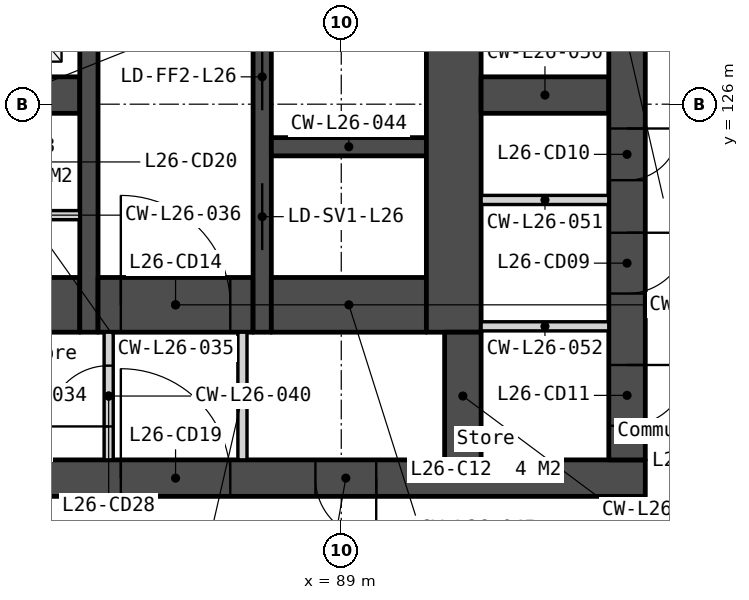
"""IFC4 building model, lengths in metres.
Left out: names, types, materials, properties, quantities, classifications, styles, units other than length and angle.
Written with IfcOpenShell. Run it as: python <this file> out.ifc"""

import sys

from ifc_helpers import new_model, si_unit, direction, frame, frame_2d, origin, place, context, subcontext, project, spatial, polyline, rectangle, outline, extrude, element, fill, save


model = new_model("IFC4")
c1 = context("Model", 3, precision=1e-05, world=origin(), true_north=direction((0.0, 1.0)))
c2 = subcontext(c1, "Body", "Model", "MODEL_VIEW")
j1 = project(units=[si_unit("LENGTHUNIT", "METRE"), si_unit("PLANEANGLEUNIT", "RADIAN")], contexts=[c1])
p1 = place(None, origin())
s1 = spatial("IfcSite", under=j1, at=p1, CompositionType="ELEMENT")
p2 = place(p1, origin())
s2 = spatial("IfcBuilding", under=s1, at=p2, CompositionType="ELEMENT")
p3 = place(p2, frame((0.0, 0.0, 106.3)))
s3 = spatial("IfcBuildingStorey", under=s2, at=p3, CompositionType="ELEMENT", Elevation=106.3)
p4 = place(p3, frame((66.0, 119.85, 0.0), z_axis=(0.0, 0.0, 1.0), x_axis=(1.0, 0.0, 0.0)))
e1 = element("IfcWall", 1, at=p4, inside=s3, PredefinedType="SOLIDWALL", context=c2, shape_type="SweptSolid", body=[
    extrude(rectangle(XDim=28.0, YDim=0.6, at=frame_2d((14.0, 0.0))), origin(), (0.0, 0.0, 1.0), 3.35),
])
p5 = place(p4, frame((6.825, 0.0, 0.0)))
e2 = element("IfcOpeningElement", 2, at=p5, cuts=e1, PredefinedType="OPENING", context=c2, shape_type="SweptSolid", body=[
    extrude(rectangle(XDim=1.8, YDim=2.1, at=frame_2d((0.9, 1.05))), frame((0.0, 0.31, 0.0), z_axis=(0.0, -1.0, 0.0), x_axis=(1.0, 0.0, 0.0)), (0.0, 0.0, 1.0), 0.62),
])
p6 = place(p4, frame((15.85, 0.0, 0.0)))
e3 = element("IfcOpeningElement", 3, at=p6, cuts=e1, PredefinedType="OPENING", context=c2, shape_type="SweptSolid", body=[
    extrude(rectangle(XDim=1.5, YDim=2.1, at=frame_2d((0.75, 1.05))), frame((0.0, 0.31, 0.0), z_axis=(0.0, -1.0, 0.0), x_axis=(1.0, 0.0, 0.0)), (0.0, 0.0, 1.0), 0.62),
])
p7 = place(p4, frame((19.375, 0.0, 0.0)))
e4 = element("IfcOpeningElement", 4, at=p7, cuts=e1, PredefinedType="OPENING", context=c2, shape_type="SweptSolid", body=[
    extrude(rectangle(XDim=1.8, YDim=2.1, at=frame_2d((0.9, 1.05))), frame((0.0, 0.31, 0.0), z_axis=(0.0, -1.0, 0.0), x_axis=(1.0, 0.0, 0.0)), (0.0, 0.0, 1.0), 0.62),
])
p8 = place(p4, frame((4.425, 0.0, 0.0)))
e5 = element("IfcOpeningElement", 5, at=p8, cuts=e1, PredefinedType="OPENING", context=c2, shape_type="SweptSolid", body=[
    extrude(rectangle(XDim=1.0, YDim=2.1, at=frame_2d((0.5, 1.05))), frame((0.0, 0.31, 0.0), z_axis=(0.0, -1.0, 0.0), x_axis=(1.0, 0.0, 0.0)), (0.0, 0.0, 1.0), 0.62),
])
p9 = place(p4, frame((9.783, 0.0, 0.0)))
e6 = element("IfcOpeningElement", 6, at=p9, cuts=e1, PredefinedType="OPENING", context=c2, shape_type="SweptSolid", body=[
    extrude(rectangle(XDim=1.0, YDim=2.1, at=frame_2d((0.5, 1.05))), frame((0.0, 0.31, 0.0), z_axis=(0.0, -1.0, 0.0), x_axis=(1.0, 0.0, 0.0)), (0.0, 0.0, 1.0), 0.62),
])
p10 = place(p4, frame((11.525, 0.0, 0.0)))
e7 = element("IfcOpeningElement", 7, at=p10, cuts=e1, PredefinedType="OPENING", context=c2, shape_type="SweptSolid", body=[
    extrude(rectangle(XDim=1.0, YDim=2.1, at=frame_2d((0.5, 1.05))), frame((0.0, 0.31, 0.0), z_axis=(0.0, -1.0, 0.0), x_axis=(1.0, 0.0, 0.0)), (0.0, 0.0, 1.0), 0.62),
])
p11 = place(p4, frame((13.658, 0.0, 0.0)))
e8 = element("IfcOpeningElement", 8, at=p11, cuts=e1, PredefinedType="OPENING", context=c2, shape_type="SweptSolid", body=[
    extrude(rectangle(XDim=1.0, YDim=2.1, at=frame_2d((0.5, 1.05))), frame((0.0, 0.31, 0.0), z_axis=(0.0, -1.0, 0.0), x_axis=(1.0, 0.0, 0.0)), (0.0, 0.0, 1.0), 0.62),
])
p12 = place(p4, frame((22.575, 0.0, 0.0)))
e9 = element("IfcOpeningElement", 9, at=p12, cuts=e1, PredefinedType="OPENING", context=c2, shape_type="SweptSolid", body=[
    extrude(rectangle(XDim=1.0, YDim=2.1, at=frame_2d((0.5, 1.05))), frame((0.0, 0.31, 0.0), z_axis=(0.0, -1.0, 0.0), x_axis=(1.0, 0.0, 0.0)), (0.0, 0.0, 1.0), 0.62),
])
p13 = place(p3, frame((81.8, 122.7, 0.0), z_axis=(0.0, 0.0, 1.0), x_axis=(1.0, 0.0, 0.0)))
e10 = element("IfcWall", 10, at=p13, inside=s3, PredefinedType="SOLIDWALL", context=c2, shape_type="SweptSolid", body=[
    extrude(rectangle(XDim=2.9, YDim=0.9, at=frame_2d((1.45, 0.0))), origin(), (0.0, 0.0, 1.0), 3.35),
])
p14 = place(p13, frame((0.05, 0.0, 0.0)))
e11 = element("IfcOpeningElement", 11, at=p14, cuts=e10, PredefinedType="OPENING", context=c2, shape_type="SweptSolid", body=[
    extrude(rectangle(XDim=1.5, YDim=2.1, at=frame_2d((0.75, 1.05))), frame((0.0, 0.46, 0.0), z_axis=(0.0, -1.0, 0.0), x_axis=(1.0, 0.0, 0.0)), (0.0, 0.0, 1.0), 0.92),
])
p15 = place(p3, frame((82.6, 126.15, 0.0), z_axis=(0.0, 0.0, 1.0), x_axis=(1.0, 0.0, 0.0)))
e12 = element("IfcWall", 12, at=p15, inside=s3, PredefinedType="SOLIDWALL", context=c2, shape_type="SweptSolid", body=[
    extrude(rectangle(XDim=2.1, YDim=0.6, at=frame_2d((1.05, 0.0))), origin(), (0.0, 0.0, 1.0), 3.35),
])
p16 = place(p3, frame((83.35, 124.175, 0.0), z_axis=(0.0, 0.0, 1.0), x_axis=(1.0, 0.0, 0.0)))
e13 = element("IfcWall", 13, at=p16, inside=s3, PredefinedType="PARTITIONING", context=c2, shape_type="SweptSolid", body=[
    extrude(rectangle(XDim=1.35, YDim=0.15, at=frame_2d((0.675, 0.0))), origin(), (0.0, 0.0, 1.0), 3.35),
])
p17 = place(p3, frame((84.85, 133.95, 0.0), z_axis=(0.0, 0.0, 1.0), x_axis=(0.0, -1.0, 0.0)))
e14 = element("IfcWall", 14, at=p17, inside=s3, PredefinedType="SOLIDWALL", context=c2, shape_type="SweptSolid", body=[
    extrude(rectangle(XDim=11.7, YDim=0.3, at=frame_2d((5.85, 0.0))), origin(), (0.0, 0.0, 1.0), 3.35),
])
p18 = place(p3, frame((85.0, 122.7, 0.0), z_axis=(0.0, 0.0, 1.0), x_axis=(1.0, 0.0, 0.0)))
e15 = element("IfcWall", 15, at=p18, inside=s3, PredefinedType="SOLIDWALL", context=c2, shape_type="SweptSolid", body=[
    extrude(rectangle(XDim=2.55, YDim=0.9, at=frame_2d((1.275, 0.0))), origin(), (0.0, 0.0, 1.0), 3.35),
])
p19 = place(p18, frame((0.375, 0.0, 0.0)))
e16 = element("IfcOpeningElement", 16, at=p19, cuts=e15, PredefinedType="OPENING", context=c2, shape_type="SweptSolid", body=[
    extrude(rectangle(XDim=1.8, YDim=2.1, at=frame_2d((0.9, 1.05))), frame((0.0, 0.46, 0.0), z_axis=(0.0, -1.0, 0.0), x_axis=(1.0, 0.0, 0.0)), (0.0, 0.0, 1.0), 0.92),
])
p20 = place(p3, frame((85.175, 122.25, 0.0), z_axis=(0.0, 0.0, 1.0), x_axis=(0.0, -1.0, 0.0)))
e17 = element("IfcWall", 17, at=p20, inside=s3, PredefinedType="PARTITIONING", context=c2, shape_type="SweptSolid", body=[
    extrude(rectangle(XDim=2.1, YDim=0.15, at=frame_2d((1.05, 0.0))), origin(), (0.0, 0.0, 1.0), 3.35),
])
p21 = place(p20, frame((0.55, 0.0, 0.0)))
e18 = element("IfcOpeningElement", 18, at=p21, cuts=e17, PredefinedType="OPENING", context=c2, shape_type="SweptSolid", body=[
    extrude(rectangle(XDim=1.0, YDim=2.1, at=frame_2d((0.5, 1.05))), frame((0.0, 0.085, 0.0), z_axis=(0.0, -1.0, 0.0), x_axis=(1.0, 0.0, 0.0)), (0.0, 0.0, 1.0), 0.17),
])
p22 = place(p3, frame((87.375, 122.25, 0.0), z_axis=(0.0, 0.0, 1.0), x_axis=(0.0, -1.0, 0.0)))
e19 = element("IfcWall", 19, at=p22, inside=s3, PredefinedType="PARTITIONING", context=c2, shape_type="SweptSolid", body=[
    extrude(rectangle(XDim=2.1, YDim=0.15, at=frame_2d((1.05, 0.0))), origin(), (0.0, 0.0, 1.0), 3.35),
])
p23 = place(p3, frame((87.7, 133.95, 0.0), z_axis=(0.0, 0.0, 1.0), x_axis=(0.0, -1.0, 0.0)))
e20 = element("IfcWall", 20, at=p23, inside=s3, PredefinedType="SOLIDWALL", context=c2, shape_type="SweptSolid", body=[
    extrude(rectangle(XDim=11.7, YDim=0.3, at=frame_2d((5.85, 0.0))), origin(), (0.0, 0.0, 1.0), 3.35),
])
p24 = place(p23, frame((6.95, 0.0, 0.0)))
e21 = element("IfcOpeningElement", 21, at=p24, cuts=e20, PredefinedType="OPENING", context=c2, shape_type="SweptSolid", body=[
    extrude(rectangle(XDim=1.1, YDim=2.1, at=frame_2d((0.55, 1.05))), frame((0.0, 0.16, 0.0), z_axis=(0.0, -1.0, 0.0), x_axis=(1.0, 0.0, 0.0)), (0.0, 0.0, 1.0), 0.32),
])
p25 = place(p23, frame((5.1, 0.0, 0.0)))
e22 = element("IfcOpeningElement", 22, at=p25, cuts=e20, PredefinedType="OPENING", context=c2, shape_type="SweptSolid", body=[
    extrude(rectangle(XDim=1.0, YDim=2.1, at=frame_2d((0.5, 1.05))), frame((0.0, 0.16, 0.0), z_axis=(0.0, -1.0, 0.0), x_axis=(1.0, 0.0, 0.0)), (0.0, 0.0, 1.0), 0.32),
])
p26 = place(p23, frame((9.25, 0.0, 0.0)))
e23 = element("IfcOpeningElement", 23, at=p26, cuts=e20, PredefinedType="OPENING", context=c2, shape_type="SweptSolid", body=[
    extrude(rectangle(XDim=1.1, YDim=2.1, at=frame_2d((0.55, 1.05))), frame((0.0, 0.16, 0.0), z_axis=(0.0, -1.0, 0.0), x_axis=(1.0, 0.0, 0.0)), (0.0, 0.0, 1.0), 0.32),
])
p27 = place(p3, frame((87.85, 125.3, 0.0), z_axis=(0.0, 0.0, 1.0), x_axis=(1.0, 0.0, 0.0)))
e24 = element("IfcWall", 24, at=p27, inside=s3, PredefinedType="SOLIDWALL", context=c2, shape_type="SweptSolid", body=[
    extrude(rectangle(XDim=2.55, YDim=0.3, at=frame_2d((1.275, 0.0))), origin(), (0.0, 0.0, 1.0), 3.35),
])
p28 = place(p3, frame((87.85, 122.7, 0.0), z_axis=(0.0, 0.0, 1.0), x_axis=(1.0, 0.0, 0.0)))
e25 = element("IfcWall", 25, at=p28, inside=s3, PredefinedType="SOLIDWALL", context=c2, shape_type="SweptSolid", body=[
    extrude(rectangle(XDim=2.55, YDim=0.9, at=frame_2d((1.275, 0.0))), origin(), (0.0, 0.0, 1.0), 3.35),
])
p29 = place(p3, frame((90.85, 133.95, 0.0), z_axis=(0.0, 0.0, 1.0), x_axis=(0.0, -1.0, 0.0)))
e26 = element("IfcWall", 26, at=p29, inside=s3, PredefinedType="SOLIDWALL", context=c2, shape_type="SweptSolid", body=[
    extrude(rectangle(XDim=11.7, YDim=0.9, at=frame_2d((5.85, 0.0))), origin(), (0.0, 0.0, 1.0), 3.35),
])
p30 = place(p3, frame((91.0, 122.25, 0.0), z_axis=(0.0, 0.0, 1.0), x_axis=(0.0, -1.0, 0.0)))
e27 = element("IfcWall", 27, at=p30, inside=s3, PredefinedType="SOLIDWALL", context=c2, shape_type="SweptSolid", body=[
    extrude(rectangle(XDim=2.1, YDim=0.6, at=frame_2d((1.05, 0.0))), origin(), (0.0, 0.0, 1.0), 3.35),
])
p31 = place(p3, frame((91.3, 126.15, 0.0), z_axis=(0.0, 0.0, 1.0), x_axis=(1.0, 0.0, 0.0)))
e28 = element("IfcWall", 28, at=p31, inside=s3, PredefinedType="SOLIDWALL", context=c2, shape_type="SweptSolid", body=[
    extrude(rectangle(XDim=2.1, YDim=0.6, at=frame_2d((1.05, 0.0))), origin(), (0.0, 0.0, 1.0), 3.35),
])
for number, where, z_axis, x_axis in (
    (29, (91.3, 124.425, 0.0), (0.0, 0.0, 1.0), (1.0, 0.0, 0.0)),
    (30, (91.3, 122.346, 0.0), (0.0, 0.0, 1.0), (1.0, 0.0, 0.0)),
):
    element("IfcWall", number, at=place(p3, frame(where, z_axis=z_axis, x_axis=x_axis)), inside=s3, PredefinedType="PARTITIONING", context=c2, shape_type="SweptSolid", body=[
        extrude(rectangle(XDim=2.1, YDim=0.15, at=frame_2d((1.05, 0.0))), origin(), (0.0, 0.0, 1.0), 3.35),
    ])
p32 = place(p3, frame((93.7, 133.95, 0.0), z_axis=(0.0, 0.0, 1.0), x_axis=(0.0, -1.0, 0.0)))
e31 = element("IfcWall", 31, at=p32, inside=s3, PredefinedType="SOLIDWALL", context=c2, shape_type="SweptSolid", body=[
    extrude(rectangle(XDim=13.8, YDim=0.6, at=frame_2d((6.9, 0.0))), origin(), (0.0, 0.0, 1.0), 3.35),
])
p33 = place(p32, frame((0.6, 0.0, 0.0)))
e32 = element("IfcOpeningElement", 32, at=p33, cuts=e31, PredefinedType="OPENING", context=c2, shape_type="SweptSolid", body=[
    extrude(rectangle(XDim=1.1, YDim=2.1, at=frame_2d((0.55, 1.05))), frame((0.0, 0.31, 0.0), z_axis=(0.0, -1.0, 0.0), x_axis=(1.0, 0.0, 0.0)), (0.0, 0.0, 1.0), 0.62),
])
p34 = place(p32, frame((10.064, 0.0, 0.0)))
e33 = element("IfcOpeningElement", 33, at=p34, cuts=e31, PredefinedType="OPENING", context=c2, shape_type="SweptSolid", body=[
    extrude(rectangle(XDim=1.0, YDim=2.1, at=frame_2d((0.5, 1.05))), frame((0.0, 0.31, 0.0), z_axis=(0.0, -1.0, 0.0), x_axis=(1.0, 0.0, 0.0)), (0.0, 0.0, 1.0), 0.62),
])
p35 = place(p32, frame((8.35, 0.0, 0.0)))
e34 = element("IfcOpeningElement", 34, at=p35, cuts=e31, PredefinedType="OPENING", context=c2, shape_type="SweptSolid", body=[
    extrude(rectangle(XDim=0.85, YDim=2.1, at=frame_2d((0.425, 1.05))), frame((0.0, 0.31, 0.0), z_axis=(0.0, -1.0, 0.0), x_axis=(1.0, 0.0, 0.0)), (0.0, 0.0, 1.0), 0.62),
])
p36 = place(p32, frame((12.239, 0.0, 0.0)))
e35 = element("IfcOpeningElement", 35, at=p36, cuts=e31, PredefinedType="OPENING", context=c2, shape_type="SweptSolid", body=[
    extrude(rectangle(XDim=1.0, YDim=2.1, at=frame_2d((0.5, 1.05))), frame((0.0, 0.31, 0.0), z_axis=(0.0, -1.0, 0.0), x_axis=(1.0, 0.0, 0.0)), (0.0, 0.0, 1.0), 0.62),
])
p37 = place(p3, frame((82.605, 93.333, -0.15), z_axis=(0.0, 0.0, 1.0), x_axis=(0.500000478905, 0.866025127289, 0.0)))
e36 = element("IfcWall", 36, at=p37, inside=s3, PredefinedType="SOLIDWALL", context=c2, shape_type="SweptSolid", body=[
    extrude(outline(polyline([(42.643, 0.0), (42.643, 3.5), (0.0, 3.5), (0.0, 0.0), (42.643, 0.0)])), frame((0.0, 0.225, 0.0), z_axis=(0.0, -1.0, 0.0), x_axis=(1.0, 0.0, 0.0)), (0.0, 0.0, 1.0), 0.45),
])
p38 = place(p37, frame((2.814, 0.0, 1.05)))
e37 = element("IfcOpeningElement", 37, at=p38, cuts=e36, PredefinedType="OPENING", context=c2, shape_type="SweptSolid", body=[
    extrude(rectangle(XDim=1.2, YDim=1.5, at=frame_2d((0.6, 0.75))), frame((0.0, 0.235, 0.0), z_axis=(0.0, -1.0, 0.0), x_axis=(1.0, 0.0, 0.0)), (0.0, 0.0, 1.0), 0.47),
])
p39 = place(p37, frame((4.514, 0.0, 1.05)))
e38 = element("IfcOpeningElement", 38, at=p39, cuts=e36, PredefinedType="OPENING", context=c2, shape_type="SweptSolid", body=[
    extrude(rectangle(XDim=1.2, YDim=1.5, at=frame_2d((0.6, 0.75))), frame((0.0, 0.235, 0.0), z_axis=(0.0, -1.0, 0.0), x_axis=(1.0, 0.0, 0.0)), (0.0, 0.0, 1.0), 0.47),
])
p40 = place(p37, frame((11.343, 0.0, 1.05)))
e39 = element("IfcOpeningElement", 39, at=p40, cuts=e36, PredefinedType="OPENING", context=c2, shape_type="SweptSolid", body=[
    extrude(rectangle(XDim=1.2, YDim=1.5, at=frame_2d((0.6, 0.75))), frame((0.0, 0.235, 0.0), z_axis=(0.0, -1.0, 0.0), x_axis=(1.0, 0.0, 0.0)), (0.0, 0.0, 1.0), 0.47),
])
p41 = place(p37, frame((13.043, 0.0, 1.05)))
e40 = element("IfcOpeningElement", 40, at=p41, cuts=e36, PredefinedType="OPENING", context=c2, shape_type="SweptSolid", body=[
    extrude(rectangle(XDim=1.2, YDim=1.5, at=frame_2d((0.6, 0.75))), frame((0.0, 0.235, 0.0), z_axis=(0.0, -1.0, 0.0), x_axis=(1.0, 0.0, 0.0)), (0.0, 0.0, 1.0), 0.47),
])
p42 = place(p37, frame((19.872, 0.0, 1.05)))
e41 = element("IfcOpeningElement", 41, at=p42, cuts=e36, PredefinedType="OPENING", context=c2, shape_type="SweptSolid", body=[
    extrude(rectangle(XDim=1.2, YDim=1.5, at=frame_2d((0.6, 0.75))), frame((0.0, 0.235, 0.0), z_axis=(0.0, -1.0, 0.0), x_axis=(1.0, 0.0, 0.0)), (0.0, 0.0, 1.0), 0.47),
])
p43 = place(p37, frame((21.572, 0.0, 1.05)))
e42 = element("IfcOpeningElement", 42, at=p43, cuts=e36, PredefinedType="OPENING", context=c2, shape_type="SweptSolid", body=[
    extrude(rectangle(XDim=1.2, YDim=1.5, at=frame_2d((0.6, 0.75))), frame((0.0, 0.235, 0.0), z_axis=(0.0, -1.0, 0.0), x_axis=(1.0, 0.0, 0.0)), (0.0, 0.0, 1.0), 0.47),
])
p44 = place(p37, frame((28.4, 0.0, 1.05)))
e43 = element("IfcOpeningElement", 43, at=p44, cuts=e36, PredefinedType="OPENING", context=c2, shape_type="SweptSolid", body=[
    extrude(rectangle(XDim=1.2, YDim=1.5, at=frame_2d((0.6, 0.75))), frame((0.0, 0.235, 0.0), z_axis=(0.0, -1.0, 0.0), x_axis=(1.0, 0.0, 0.0)), (0.0, 0.0, 1.0), 0.47),
])
p45 = place(p37, frame((30.1, 0.0, 1.05)))
e44 = element("IfcOpeningElement", 44, at=p45, cuts=e36, PredefinedType="OPENING", context=c2, shape_type="SweptSolid", body=[
    extrude(rectangle(XDim=1.2, YDim=1.5, at=frame_2d((0.6, 0.75))), frame((0.0, 0.235, 0.0), z_axis=(0.0, -1.0, 0.0), x_axis=(1.0, 0.0, 0.0)), (0.0, 0.0, 1.0), 0.47),
])
p46 = place(p37, frame((36.929, 0.0, 1.05)))
e45 = element("IfcOpeningElement", 45, at=p46, cuts=e36, PredefinedType="OPENING", context=c2, shape_type="SweptSolid", body=[
    extrude(rectangle(XDim=1.2, YDim=1.5, at=frame_2d((0.6, 0.75))), frame((0.0, 0.235, 0.0), z_axis=(0.0, -1.0, 0.0), x_axis=(1.0, 0.0, 0.0)), (0.0, 0.0, 1.0), 0.47),
])
p47 = place(p37, frame((38.629, 0.0, 1.05)))
e46 = element("IfcOpeningElement", 46, at=p47, cuts=e36, PredefinedType="OPENING", context=c2, shape_type="SweptSolid", body=[
    extrude(rectangle(XDim=1.2, YDim=1.5, at=frame_2d((0.6, 0.75))), frame((0.0, 0.235, 0.0), z_axis=(0.0, -1.0, 0.0), x_axis=(1.0, 0.0, 0.0)), (0.0, 0.0, 1.0), 0.47),
])
p48 = place(p34, origin())
e47 = element("IfcDoor", 47, at=p48, inside=s3, OperationType="SINGLE_SWING_LEFT", PredefinedType="DOOR", context=c2, shape_type="SweptSolid", body=[
    extrude(rectangle(XDim=1.0, YDim=2.1, at=frame_2d((0.5, 1.05))), frame((0.0, 0.025, 0.0), z_axis=(0.0, -1.0, 0.0), x_axis=(1.0, 0.0, 0.0)), (0.0, 0.0, 1.0), 0.05),
])
fill(e33, e47)
p49 = place(p35, origin())
e48 = element("IfcDoor", 48, at=p49, inside=s3, OperationType="SINGLE_SWING_LEFT", PredefinedType="DOOR", context=c2, shape_type="SweptSolid", body=[
    extrude(rectangle(XDim=0.85, YDim=2.1, at=frame_2d((0.425, 1.05))), frame((0.0, 0.025, 0.0), z_axis=(0.0, -1.0, 0.0), x_axis=(1.0, 0.0, 0.0)), (0.0, 0.0, 1.0), 0.05),
])
fill(e34, e48)
p50 = place(p36, origin())
e49 = element("IfcDoor", 49, at=p50, inside=s3, OperationType="SINGLE_SWING_LEFT", PredefinedType="DOOR", context=c2, shape_type="SweptSolid", body=[
    extrude(rectangle(XDim=1.0, YDim=2.1, at=frame_2d((0.5, 1.05))), frame((0.0, 0.025, 0.0), z_axis=(0.0, -1.0, 0.0), x_axis=(1.0, 0.0, 0.0)), (0.0, 0.0, 1.0), 0.05),
])
fill(e35, e49)
p51 = place(p24, origin())
e50 = element("IfcDoor", 50, at=p51, inside=s3, OperationType="SLIDING_TO_LEFT", PredefinedType="DOOR", context=c2, shape_type="SweptSolid", body=[
    extrude(rectangle(XDim=1.1, YDim=2.1, at=frame_2d((0.55, 1.05))), frame((0.0, 0.025, 0.0), z_axis=(0.0, -1.0, 0.0), x_axis=(1.0, 0.0, 0.0)), (0.0, 0.0, 1.0), 0.05),
])
fill(e21, e50)
p52 = place(p19, origin())
e51 = element("IfcDoor", 51, at=p52, inside=s3, OperationType="DOUBLE_DOOR_DOUBLE_SWING", PredefinedType="DOOR", context=c2, shape_type="SweptSolid", body=[
    extrude(rectangle(XDim=1.8, YDim=2.1, at=frame_2d((0.9, 1.05))), frame((0.0, 0.025, 0.0), z_axis=(0.0, -1.0, 0.0), x_axis=(1.0, 0.0, 0.0)), (0.0, 0.0, 1.0), 0.05),
])
fill(e16, e51)
p53 = place(p7, origin())
e52 = element("IfcDoor", 52, at=p53, inside=s3, OperationType="DOUBLE_DOOR_DOUBLE_SWING", PredefinedType="DOOR", context=c2, shape_type="SweptSolid", body=[
    extrude(rectangle(XDim=1.8, YDim=2.1, at=frame_2d((0.9, 1.05))), frame((0.0, 0.025, 0.0), z_axis=(0.0, -1.0, 0.0), x_axis=(1.0, 0.0, 0.0)), (0.0, 0.0, 1.0), 0.05),
])
fill(e4, e52)
p54 = place(p21, origin())
e53 = element("IfcDoor", 53, at=p54, inside=s3, OperationType="SINGLE_SWING_RIGHT", PredefinedType="DOOR", context=c2, shape_type="SweptSolid", body=[
    extrude(rectangle(XDim=1.0, YDim=2.1, at=frame_2d((0.5, 1.05))), frame((0.0, 0.025, 0.0), z_axis=(0.0, -1.0, 0.0), x_axis=(1.0, 0.0, 0.0)), (0.0, 0.0, 1.0), 0.05),
])
fill(e18, e53)
p55 = place(p12, origin())
e54 = element("IfcDoor", 54, at=p55, inside=s3, OperationType="SINGLE_SWING_RIGHT", PredefinedType="DOOR", context=c2, shape_type="SweptSolid", body=[
    extrude(rectangle(XDim=1.0, YDim=2.1, at=frame_2d((0.5, 1.05))), frame((0.0, 0.025, 0.0), z_axis=(0.0, -1.0, 0.0), x_axis=(1.0, 0.0, 0.0)), (0.0, 0.0, 1.0), 0.05),
])
fill(e9, e54)
p56 = place(p26, origin())
e55 = element("IfcDoor", 55, at=p56, inside=s3, OperationType="SLIDING_TO_LEFT", PredefinedType="DOOR", context=c2, shape_type="SweptSolid", body=[
    extrude(rectangle(XDim=1.1, YDim=2.1, at=frame_2d((0.55, 1.05))), frame((0.0, 0.025, 0.0), z_axis=(0.0, -1.0, 0.0), x_axis=(1.0, 0.0, 0.0)), (0.0, 0.0, 1.0), 0.05),
])
fill(e23, e55)
save(model, sys.argv[1])
